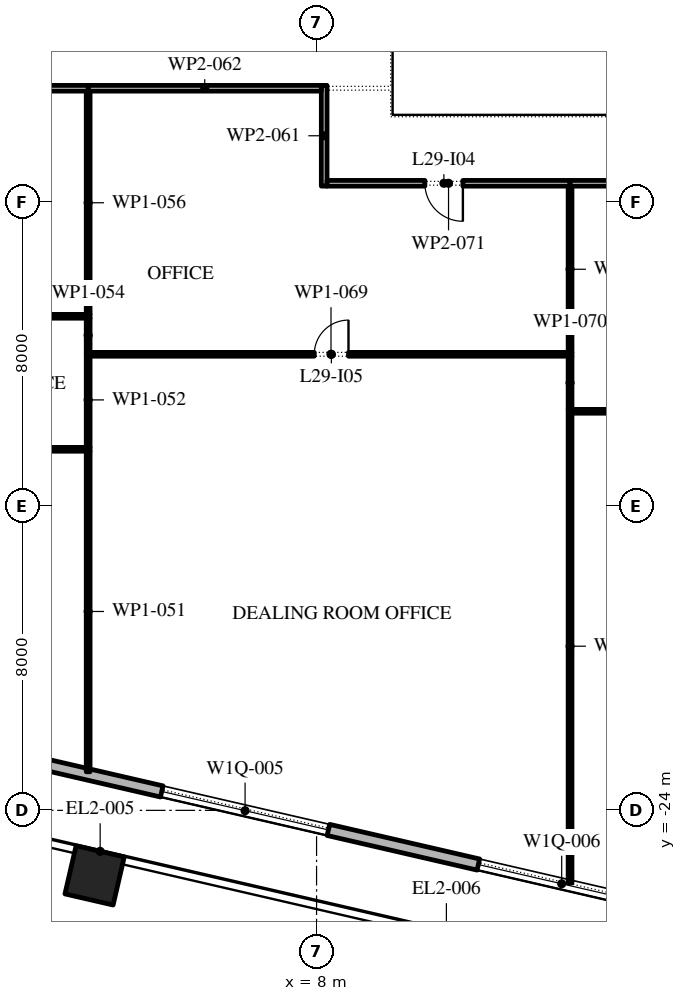
"""IFC4 building model, lengths in metres.
Left out: names, types, materials, properties, quantities, classifications, styles, units other than length and angle.
Written with IfcOpenShell. Run it as: python <this file> out.ifc"""

import sys

from ifc_helpers import new_model, si_unit, direction, frame, frame_2d, origin, origin_2d, place, context, subcontext, project, spatial, rectangle, extrude, element, fill, save


model = new_model("IFC4")
c1 = context("Model", 3, precision=1e-05, world=origin(), true_north=direction((0.0, 1.0)))
c2 = subcontext(c1, "Body", "Model", "MODEL_VIEW")
j1 = project(units=[si_unit("LENGTHUNIT", "METRE"), si_unit("PLANEANGLEUNIT", "RADIAN")], contexts=[c1])
p1 = place(None, origin())
s1 = spatial("IfcSite", under=j1, at=p1, CompositionType="ELEMENT")
p2 = place(p1, origin())
s2 = spatial("IfcBuilding", under=s1, at=p2, CompositionType="ELEMENT")
p3 = place(p2, frame((0.0, 0.0, 135.0)))
s3 = spatial("IfcBuildingStorey", under=s2, at=p3, CompositionType="ELEMENT", Elevation=135.0)
p4 = place(p3, frame((2.159, -25.711, 0.0), z_axis=(0.0, 0.0, 1.0), x_axis=(0.974370064785, -0.224951054344, 0.0)))
e1 = element("IfcColumn", 1, at=p4, inside=s3, PredefinedType="COLUMN", context=c2, shape_type="SweptSolid", body=[
    extrude(rectangle(XDim=1.3, YDim=1.3, at=origin_2d()), origin(), (0.0, 0.0, 1.0), 4.2),
])
p5 = place(p3, frame((-31.078, -15.421, 0.0), z_axis=(0.0, 0.0, 1.0), x_axis=(0.974370456532, -0.224949357493, 0.0)))
e2 = element("IfcWall", 2, at=p5, inside=s3, PredefinedType="STANDARD", context=c2, shape_type="SweptSolid", body=[
    extrude(rectangle(XDim=51.0, YDim=0.3, at=frame_2d((25.5, 0.0))), origin(), (0.0, 0.0, 1.0), 4.0),
])
p6 = place(p5, frame((1.875, 0.0, 0.45)))
e3 = element("IfcOpeningElement", 3, at=p6, cuts=e2, PredefinedType="OPENING", context=c2, shape_type="SweptSolid", body=[
    extrude(rectangle(XDim=4.5, YDim=2.575, at=frame_2d((2.25, 1.288))), frame((0.0, 0.16, 0.0), z_axis=(0.0, -1.0, 0.0), x_axis=(1.0, 0.0, 0.0)), (0.0, 0.0, 1.0), 0.32),
])
p7 = place(p5, frame((10.275, 0.0, 0.45)))
e4 = element("IfcOpeningElement", 4, at=p7, cuts=e2, PredefinedType="OPENING", context=c2, shape_type="SweptSolid", body=[
    extrude(rectangle(XDim=4.5, YDim=2.525, at=frame_2d((2.25, 1.262))), frame((0.0, 0.16, 0.0), z_axis=(0.0, -1.0, 0.0), x_axis=(1.0, 0.0, 0.0)), (0.0, 0.0, 1.0), 0.32),
])
p8 = place(p5, frame((18.825, 0.0, 0.45)))
e5 = element("IfcOpeningElement", 5, at=p8, cuts=e2, PredefinedType="OPENING", context=c2, shape_type="SweptSolid", body=[
    extrude(rectangle(XDim=4.5, YDim=2.5, at=frame_2d((2.25, 1.25))), frame((0.0, 0.16, 0.0), z_axis=(0.0, -1.0, 0.0), x_axis=(1.0, 0.0, 0.0)), (0.0, 0.0, 1.0), 0.32),
])
p9 = place(p5, frame((28.425, 0.0, 0.0)))
e6 = element("IfcOpeningElement", 6, at=p9, cuts=e2, PredefinedType="OPENING", context=c2, shape_type="SweptSolid", body=[
    extrude(rectangle(XDim=2.4, YDim=2.9, at=frame_2d((1.2, 1.45))), frame((0.0, 0.16, 0.0), z_axis=(0.0, -1.0, 0.0), x_axis=(1.0, 0.0, 0.0)), (0.0, 0.0, 1.0), 0.32),
])
p10 = place(p5, frame((35.925, 0.0, 0.45)))
e7 = element("IfcOpeningElement", 7, at=p10, cuts=e2, PredefinedType="OPENING", context=c2, shape_type="SweptSolid", body=[
    extrude(rectangle(XDim=4.5, YDim=2.45, at=frame_2d((2.25, 1.225))), frame((0.0, 0.16, 0.0), z_axis=(0.0, -1.0, 0.0), x_axis=(1.0, 0.0, 0.0)), (0.0, 0.0, 1.0), 0.32),
])
p11 = place(p5, frame((44.475, 0.0, 0.45)))
e8 = element("IfcOpeningElement", 8, at=p11, cuts=e2, PredefinedType="OPENING", context=c2, shape_type="SweptSolid", body=[
    extrude(rectangle(XDim=4.5, YDim=2.45, at=frame_2d((2.25, 1.225))), frame((0.0, 0.16, 0.0), z_axis=(0.0, -1.0, 0.0), x_axis=(1.0, 0.0, 0.0)), (0.0, 0.0, 1.0), 0.32),
])
p12 = place(p3, frame((2.04, -14.5, 0.0), z_axis=(0.0, 0.0, 1.0), x_axis=(-1.0, 0.0, 0.0)))
e9 = element("IfcWall", 9, at=p12, inside=s3, PredefinedType="PARTITIONING", context=c2, shape_type="SweptSolid", body=[
    extrude(rectangle(XDim=8.33, YDim=0.1, at=frame_2d((4.165, 0.0))), origin(), (0.0, 0.0, 1.0), 4.0),
])
p13 = place(p3, frame((1.99, -14.55, 0.0), z_axis=(0.0, 0.0, 1.0), x_axis=(0.0, -1.0, 0.0)))
e10 = element("IfcWall", 10, at=p13, inside=s3, PredefinedType="PARTITIONING", context=c2, shape_type="SweptSolid", body=[
    extrude(rectangle(XDim=8.434, YDim=0.1, at=frame_2d((4.217, 0.0))), origin(), (0.0, 0.0, 1.0), 4.0),
])
p14 = place(p3, frame((1.99, -11.95, 0.0), z_axis=(0.0, 0.0, 1.0), x_axis=(0.0, -1.0, 0.0)))
e11 = element("IfcWall", 11, at=p14, inside=s3, PredefinedType="PARTITIONING", context=c2, shape_type="SweptSolid", body=[
    extrude(rectangle(XDim=2.5, YDim=0.1, at=frame_2d((1.25, 0.0))), origin(), (0.0, 0.0, 1.0), 4.0),
])
p15 = place(p3, frame((2.04, -11.0, 0.0), z_axis=(0.0, 0.0, 1.0), x_axis=(-1.0, 0.0, 0.0)))
e12 = element("IfcWall", 12, at=p15, inside=s3, PredefinedType="PARTITIONING", context=c2, shape_type="SweptSolid", body=[
    extrude(rectangle(XDim=8.33, YDim=0.1, at=frame_2d((4.165, 0.0))), origin(), (0.0, 0.0, 1.0), 4.0),
])
p16 = place(p15, frame((5.53, 0.0, 0.0)))
e13 = element("IfcOpeningElement", 13, at=p16, cuts=e12, PredefinedType="OPENING", context=c2, shape_type="SweptSolid", body=[
    extrude(rectangle(XDim=0.9, YDim=2.1, at=frame_2d((0.45, 1.05))), frame((0.0, 0.06, 0.0), z_axis=(0.0, -1.0, 0.0), x_axis=(1.0, 0.0, 0.0)), (0.0, 0.0, 1.0), 0.12),
])
p17 = place(p3, frame((1.99, -11.05, 0.0), z_axis=(0.0, 0.0, 1.0), x_axis=(0.0, -1.0, 0.0)))
e14 = element("IfcWall", 14, at=p17, inside=s3, PredefinedType="PARTITIONING", context=c2, shape_type="SweptSolid", body=[
    extrude(rectangle(XDim=0.9, YDim=0.1, at=frame_2d((0.45, 0.0))), origin(), (0.0, 0.0, 1.0), 4.0),
])
p18 = place(p3, frame((2.04, -5.0, 0.0), z_axis=(0.0, 0.0, 1.0), x_axis=(-1.0, 0.0, 0.0)))
e15 = element("IfcWall", 15, at=p18, inside=s3, PredefinedType="PARTITIONING", context=c2, shape_type="SweptSolid", body=[
    extrude(rectangle(XDim=8.305, YDim=0.15, at=frame_2d((4.152, 0.0))), origin(), (0.0, 0.0, 1.0), 4.0),
])
p19 = place(p18, frame((1.98, 0.0, 0.0)))
e16 = element("IfcOpeningElement", 16, at=p19, cuts=e15, PredefinedType="OPENING", context=c2, shape_type="SweptSolid", body=[
    extrude(rectangle(XDim=1.0, YDim=2.1, at=frame_2d((0.5, 1.05))), frame((0.0, 0.085, 0.0), z_axis=(0.0, -1.0, 0.0), x_axis=(1.0, 0.0, 0.0)), (0.0, 0.0, 1.0), 0.17),
])
p20 = place(p3, frame((1.99, -5.075, 0.0), z_axis=(0.0, 0.0, 1.0), x_axis=(0.0, -1.0, 0.0)))
e17 = element("IfcWall", 17, at=p20, inside=s3, PredefinedType="PARTITIONING", context=c2, shape_type="SweptSolid", body=[
    extrude(rectangle(XDim=5.875, YDim=0.1, at=frame_2d((2.938, 0.0))), origin(), (0.0, 0.0, 1.0), 4.0),
])
p21 = place(p3, frame((8.2, -7.575, 0.0), z_axis=(0.0, 0.0, 1.0), x_axis=(0.0, 1.0, 0.0)))
e18 = element("IfcWall", 18, at=p21, inside=s3, PredefinedType="PARTITIONING", context=c2, shape_type="SweptSolid", body=[
    extrude(rectangle(XDim=2.65, YDim=0.15, at=frame_2d((1.325, 0.0))), origin(), (0.0, 0.0, 1.0), 4.0),
])
p22 = place(p3, frame((8.125, -5.0, 0.0), z_axis=(0.0, 0.0, 1.0), x_axis=(-1.0, 0.0, 0.0)))
e19 = element("IfcWall", 19, at=p22, inside=s3, PredefinedType="PARTITIONING", context=c2, shape_type="SweptSolid", body=[
    extrude(rectangle(XDim=6.135, YDim=0.15, at=frame_2d((3.067, 0.0))), origin(), (0.0, 0.0, 1.0), 4.0),
])
p23 = place(p3, frame((14.67, -13.45, 0.0), z_axis=(0.0, 0.0, 1.0), x_axis=(0.0, -1.0, 0.0)))
e20 = element("IfcWall", 20, at=p23, inside=s3, PredefinedType="PARTITIONING", context=c2, shape_type="SweptSolid", body=[
    extrude(rectangle(XDim=12.461, YDim=0.1, at=frame_2d((6.23, 0.0))), origin(), (0.0, 0.0, 1.0), 4.0),
])
p24 = place(p3, frame((14.72, -12.0, 0.0), z_axis=(0.0, 0.0, 1.0), x_axis=(-1.0, 0.0, 0.0)))
e21 = element("IfcWall", 21, at=p24, inside=s3, PredefinedType="PARTITIONING", context=c2, shape_type="SweptSolid", body=[
    extrude(rectangle(XDim=12.68, YDim=0.1, at=frame_2d((6.34, 0.0))), origin(), (0.0, 0.0, 1.0), 4.0),
])
p25 = place(p24, frame((5.88, 0.0, 0.0)))
e22 = element("IfcOpeningElement", 22, at=p25, cuts=e21, PredefinedType="OPENING", context=c2, shape_type="SweptSolid", body=[
    extrude(rectangle(XDim=0.9, YDim=2.1, at=frame_2d((0.45, 1.05))), frame((0.0, 0.06, 0.0), z_axis=(0.0, -1.0, 0.0), x_axis=(1.0, 0.0, 0.0)), (0.0, 0.0, 1.0), 0.12),
])
p26 = place(p3, frame((14.67, -12.05, 0.0), z_axis=(0.0, 0.0, 1.0), x_axis=(0.0, -1.0, 0.0)))
e23 = element("IfcWall", 23, at=p26, inside=s3, PredefinedType="PARTITIONING", context=c2, shape_type="SweptSolid", body=[
    extrude(rectangle(XDim=1.4, YDim=0.1, at=frame_2d((0.7, 0.0))), origin(), (0.0, 0.0, 1.0), 4.0),
])
p27 = place(p3, frame((14.67, -7.5, 0.0), z_axis=(0.0, 0.0, 1.0), x_axis=(-1.0, 0.0, 0.0)))
e24 = element("IfcWall", 24, at=p27, inside=s3, PredefinedType="PARTITIONING", context=c2, shape_type="SweptSolid", body=[
    extrude(rectangle(XDim=6.395, YDim=0.15, at=frame_2d((3.198, 0.0))), origin(), (0.0, 0.0, 1.0), 4.0),
])
p28 = place(p27, frame((2.82, 0.0, 0.0)))
e25 = element("IfcOpeningElement", 25, at=p28, cuts=e24, PredefinedType="OPENING", context=c2, shape_type="SweptSolid", body=[
    extrude(rectangle(XDim=1.0, YDim=2.1, at=frame_2d((0.5, 1.05))), frame((0.0, 0.085, 0.0), z_axis=(0.0, -1.0, 0.0), x_axis=(1.0, 0.0, 0.0)), (0.0, 0.0, 1.0), 0.17),
])
p29 = place(p3, frame((14.67, -7.575, 0.0), z_axis=(0.0, 0.0, 1.0), x_axis=(0.0, -1.0, 0.0)))
e26 = element("IfcWall", 26, at=p29, inside=s3, PredefinedType="PARTITIONING", context=c2, shape_type="SweptSolid", body=[
    extrude(rectangle(XDim=4.375, YDim=0.1, at=frame_2d((2.188, 0.0))), origin(), (0.0, 0.0, 1.0), 4.0),
])
p30 = place(p3, frame((23.06, -13.5, 0.0), z_axis=(0.0, 0.0, 1.0), x_axis=(-1.0, 0.0, 0.0)))
e27 = element("IfcWall", 27, at=p30, inside=s3, PredefinedType="PARTITIONING", context=c2, shape_type="SweptSolid", body=[
    extrude(rectangle(XDim=8.34, YDim=0.1, at=frame_2d((4.17, 0.0))), origin(), (0.0, 0.0, 1.0), 4.0),
])
p31 = place(p30, frame((2.04, 0.0, 0.0)))
e28 = element("IfcOpeningElement", 28, at=p31, cuts=e27, PredefinedType="OPENING", context=c2, shape_type="SweptSolid", body=[
    extrude(rectangle(XDim=0.9, YDim=2.1, at=frame_2d((0.45, 1.05))), frame((0.0, 0.06, 0.0), z_axis=(0.0, -1.0, 0.0), x_axis=(1.0, 0.0, 0.0)), (0.0, 0.0, 1.0), 0.12),
])
p32 = place(p3, frame((23.06, -7.5, 0.0), z_axis=(0.0, 0.0, 1.0), x_axis=(-1.0, 0.0, 0.0)))
e29 = element("IfcWall", 29, at=p32, inside=s3, PredefinedType="PARTITIONING", context=c2, shape_type="SweptSolid", body=[
    extrude(rectangle(XDim=8.39, YDim=0.15, at=frame_2d((4.195, 0.0))), origin(), (0.0, 0.0, 1.0), 4.0),
])
p33 = place(p32, frame((1.99, 0.0, 0.0)))
e30 = element("IfcOpeningElement", 30, at=p33, cuts=e29, PredefinedType="OPENING", context=c2, shape_type="SweptSolid", body=[
    extrude(rectangle(XDim=1.0, YDim=2.1, at=frame_2d((0.5, 1.05))), frame((0.0, 0.085, 0.0), z_axis=(0.0, -1.0, 0.0), x_axis=(1.0, 0.0, 0.0)), (0.0, 0.0, 1.0), 0.17),
])
p34 = place(p10, origin())
e31 = element("IfcWindow", 31, at=p34, inside=s3, PartitioningType="DOUBLE_PANEL_VERTICAL", PredefinedType="WINDOW", context=c2, shape_type="SweptSolid", body=[
    extrude(rectangle(XDim=4.5, YDim=2.45, at=frame_2d((2.25, 1.225))), frame((0.0, 0.03, 0.0), z_axis=(0.0, -1.0, 0.0), x_axis=(1.0, 0.0, 0.0)), (0.0, 0.0, 1.0), 0.06),
])
fill(e7, e31)
p35 = place(p11, origin())
e32 = element("IfcWindow", 32, at=p35, inside=s3, PartitioningType="DOUBLE_PANEL_VERTICAL", PredefinedType="WINDOW", context=c2, shape_type="SweptSolid", body=[
    extrude(rectangle(XDim=4.5, YDim=2.45, at=frame_2d((2.25, 1.225))), frame((0.0, 0.03, 0.0), z_axis=(0.0, -1.0, 0.0), x_axis=(1.0, 0.0, 0.0)), (0.0, 0.0, 1.0), 0.06),
])
fill(e8, e32)
p36 = place(p28, origin())
e33 = element("IfcDoor", 33, at=p36, inside=s3, OperationType="SINGLE_SWING_RIGHT", PredefinedType="DOOR", context=c2, shape_type="SweptSolid", body=[
    extrude(rectangle(XDim=1.0, YDim=2.1, at=frame_2d((0.5, 1.05))), frame((0.0, 0.025, 0.0), z_axis=(0.0, -1.0, 0.0), x_axis=(1.0, 0.0, 0.0)), (0.0, 0.0, 1.0), 0.05),
])
fill(e25, e33)
p37 = place(p25, frame((0.9, 0.0, 0.0), z_axis=(0.0, 0.0, 1.0), x_axis=(-1.0, 0.0, 0.0)))
e34 = element("IfcDoor", 34, at=p37, inside=s3, OperationType="SINGLE_SWING_LEFT", PredefinedType="DOOR", context=c2, shape_type="SweptSolid", body=[
    extrude(rectangle(XDim=0.9, YDim=2.1, at=frame_2d((0.45, 1.05))), frame((0.0, 0.025, 0.0), z_axis=(0.0, -1.0, 0.0), x_axis=(1.0, 0.0, 0.0)), (0.0, 0.0, 1.0), 0.05),
])
fill(e22, e34)
save(model, sys.argv[1])
